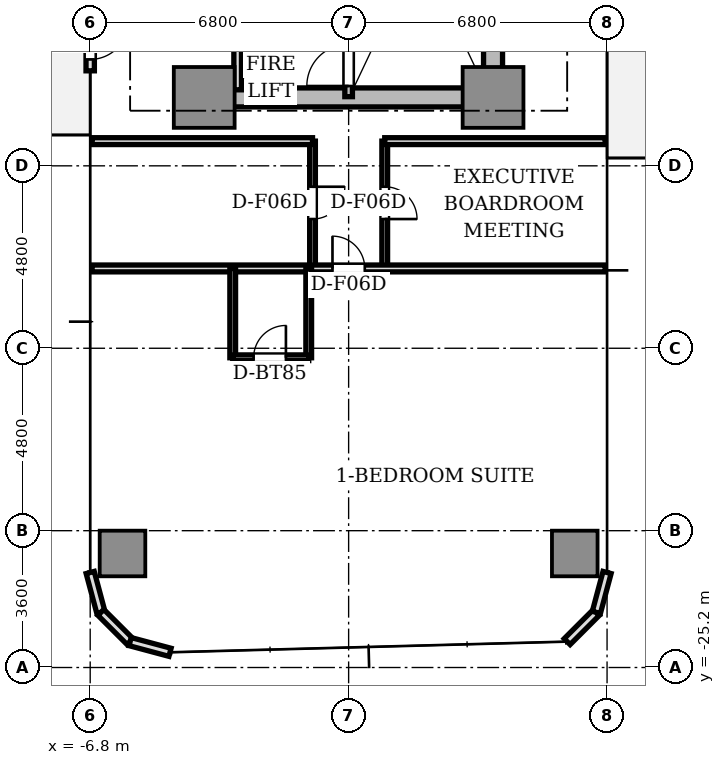
"""IFC4 building model, lengths in metres.
Left out: names, types, materials, properties, quantities, classifications, styles, units other than length and angle.
Written with IfcOpenShell. Run it as: python <this file> out.ifc"""

import sys

from ifc_helpers import new_model, si_unit, direction, frame, frame_2d, origin, origin_2d, place, context, subcontext, project, spatial, rectangle, extrude, source, transform, mapped, element, fill, save


model = new_model("IFC4")
c1 = context("Model", 3, precision=1e-05, world=origin(), true_north=direction((0.0, 1.0)))
c2 = subcontext(c1, "Body", "Model", "MODEL_VIEW")
j1 = project(units=[si_unit("LENGTHUNIT", "METRE"), si_unit("PLANEANGLEUNIT", "RADIAN")], contexts=[c1])
p1 = place(None, origin())
s1 = spatial("IfcSite", under=j1, at=p1, CompositionType="ELEMENT")
p2 = place(p1, origin())
s2 = spatial("IfcBuilding", under=s1, at=p2, CompositionType="ELEMENT")
p3 = place(p2, frame((0.0, 0.0, 51.05)))
s3 = spatial("IfcBuildingStorey", under=s2, at=p3, CompositionType="ELEMENT", Elevation=51.05)
p4 = place(p3, frame((-3.55, -10.2, 0.0), z_axis=(0.0, 0.0, 1.0), x_axis=(1.0, 0.0, 0.0)))
e1 = element("IfcWall", 1, at=p4, inside=s3, PredefinedType="SHEAR", context=c2, shape_type="SweptSolid", body=[
    extrude(rectangle(XDim=7.1, YDim=0.5, at=frame_2d((3.55, 0.0))), origin(), (0.0, 0.0, 1.0), 3.11),
])
p5 = place(p3, frame((3.8, -9.75, 0.0), z_axis=(0.0, 0.0, 1.0), x_axis=(0.0, 1.0, 0.0)))
e2 = element("IfcWall", 2, at=p5, inside=s3, PredefinedType="SHEAR", context=c2, shape_type="SweptSolid", body=[
    extrude(rectangle(XDim=6.9, YDim=0.5, at=frame_2d((3.45, 0.0))), origin(), (0.0, 0.0, 1.0), 3.11),
])
m1 = source(origin(), c2, "Body", "SweptSolid", [
    extrude(rectangle(XDim=1.6, YDim=1.6, at=origin_2d()), origin(), (0.0, 0.0, 1.0), 3.11),
])
for number, where, z_axis, x_axis in (
    (3, (-3.8, -10.2, 0.0), (0.0, 0.0, 1.0), (1.0, 0.0, 0.0)),
    (4, (3.8, -10.2, 0.0), (0.0, 0.0, 1.0), (1.0, 0.0, 0.0)),
):
    element("IfcColumn", number, at=place(p3, frame(where, z_axis=z_axis, x_axis=x_axis)), inside=s3, PredefinedType="COLUMN", context=c2, shape_type="MappedRepresentation", body=[
        mapped(m1, transform((0.0, 0.0, 0.0), scale=1.0)),
    ])
m2 = source(origin(), c2, "Body", "SweptSolid", [
    extrude(rectangle(XDim=1.2, YDim=1.2, at=origin_2d()), origin(), (0.0, 0.0, 1.0), 3.11),
])
for number, where, z_axis, x_axis in (
    (5, (-5.95, -22.2, 0.0), (0.0, 0.0, 1.0), (1.0, 0.0, 0.0)),
    (6, (5.95, -22.2, 0.0), (0.0, 0.0, 1.0), (1.0, 0.0, 0.0)),
):
    element("IfcColumn", number, at=place(p3, frame(where, z_axis=z_axis, x_axis=x_axis)), inside=s3, PredefinedType="COLUMN", context=c2, shape_type="MappedRepresentation", body=[
        mapped(m2, transform((0.0, 0.0, 0.0), scale=1.0)),
    ])
p6 = place(p3, frame((-6.8, -6.8, 0.0), z_axis=(0.0, 0.0, 1.0), x_axis=(0.0, -1.0, 0.0)))
e7 = element("IfcWall", 7, at=p6, inside=s3, PredefinedType="STANDARD", context=c2, shape_type="SweptSolid", body=[
    extrude(rectangle(XDim=2.7, YDim=0.22, at=frame_2d((1.35, 0.0))), origin(), (0.0, 0.0, 1.0), 3.11),
])
p7 = place(p6, frame((1.4, 0.0, 0.0)))
e8 = element("IfcOpeningElement", 8, at=p7, cuts=e7, PredefinedType="OPENING", context=c2, shape_type="SweptSolid", body=[
    extrude(rectangle(XDim=1.0, YDim=2.2, at=frame_2d((0.5, 1.1))), frame((0.0, 0.12, 0.0), z_axis=(0.0, -1.0, 0.0), x_axis=(1.0, 0.0, 0.0)), (0.0, 0.0, 1.0), 0.24),
])
for number, where, z_axis, x_axis in (
    (9, (-6.8, -22.7, 0.0), (0.0, 0.0, 1.0), (0.259, -0.966, 0.0)),
    (10, (-6.519, -23.75, 0.0), (0.0, 0.0, 1.0), (0.707, -0.707, 0.0)),
    (11, (-5.75, -24.519, 0.0), (0.0, 0.0, 1.0), (0.966, -0.259, 0.0)),
    (12, (5.75, -24.519, 0.0), (0.0, 0.0, 1.0), (0.707, 0.707, 0.0)),
    (13, (6.519, -23.75, 0.0), (0.0, 0.0, 1.0), (0.259, 0.966, 0.0)),
):
    element("IfcWall", number, at=place(p3, frame(where, z_axis=z_axis, x_axis=x_axis)), inside=s3, PredefinedType="STANDARD", context=c2, shape_type="SweptSolid", body=[
        extrude(rectangle(XDim=1.087, YDim=0.22, at=frame_2d((0.543, 0.0))), origin(), (0.0, 0.0, 1.0), 3.11),
    ])
p8 = place(p3, frame((0.0, -10.18, 0.0), z_axis=(0.0, 0.0, 1.0), x_axis=(0.0, 1.0, 0.0)))
e14 = element("IfcWall", 14, at=p8, inside=s3, PredefinedType="SOLIDWALL", context=c2, shape_type="SweptSolid", body=[
    extrude(rectangle(XDim=7.68, YDim=0.2, at=frame_2d((3.84, 0.0))), origin(), (0.0, 0.0, 1.0), 3.11),
])
p9 = place(p8, frame((0.28, 0.0, 0.0)))
e15 = element("IfcOpeningElement", 15, at=p9, cuts=e14, PredefinedType="OPENING", context=c2, shape_type="SweptSolid", body=[
    extrude(rectangle(XDim=1.1, YDim=2.15, at=frame_2d((0.55, 1.075))), frame((0.0, 0.11, 0.0), z_axis=(0.0, -1.0, 0.0), x_axis=(1.0, 0.0, 0.0)), (0.0, 0.0, 1.0), 0.22),
])
p10 = place(p3, frame((-2.92, -10.0, 0.0), z_axis=(0.0, 0.0, 1.0), x_axis=(0.0, 1.0, 0.0)))
e16 = element("IfcWall", 16, at=p10, inside=s3, PredefinedType="SOLIDWALL", context=c2, shape_type="SweptSolid", body=[
    extrude(rectangle(XDim=1.44, YDim=0.2, at=frame_2d((0.72, 0.0))), origin(), (0.0, 0.0, 1.0), 2.66),
])
p11 = place(p3, frame((0.95, -11.35, 0.0), z_axis=(0.0, 0.0, 1.0), x_axis=(0.0, -1.0, 0.0)))
e17 = element("IfcWall", 17, at=p11, inside=s3, PredefinedType="PARTITIONING", context=c2, shape_type="SweptSolid", body=[
    extrude(rectangle(XDim=3.35, YDim=0.15, at=frame_2d((1.675, 0.0))), origin(), (0.0, 0.0, 1.0), 2.66),
])
p12 = place(p11, frame((1.2, 0.0, 0.0)))
e18 = element("IfcOpeningElement", 18, at=p12, cuts=e17, PredefinedType="OPENING", context=c2, shape_type="SweptSolid", body=[
    extrude(rectangle(XDim=0.85, YDim=2.1, at=frame_2d((0.425, 1.05))), frame((0.0, 0.085, 0.0), z_axis=(0.0, -1.0, 0.0), x_axis=(1.0, 0.0, 0.0)), (0.0, 0.0, 1.0), 0.17),
])
p13 = place(p3, frame((-0.95, -11.35, 0.0), z_axis=(0.0, 0.0, 1.0), x_axis=(0.0, -1.0, 0.0)))
e19 = element("IfcWall", 19, at=p13, inside=s3, PredefinedType="PARTITIONING", context=c2, shape_type="SweptSolid", body=[
    extrude(rectangle(XDim=3.35, YDim=0.15, at=frame_2d((1.675, 0.0))), origin(), (0.0, 0.0, 1.0), 2.66),
])
p14 = place(p13, frame((1.2, 0.0, 0.0)))
e20 = element("IfcOpeningElement", 20, at=p14, cuts=e19, PredefinedType="OPENING", context=c2, shape_type="SweptSolid", body=[
    extrude(rectangle(XDim=0.85, YDim=2.1, at=frame_2d((0.425, 1.05))), frame((0.0, 0.085, 0.0), z_axis=(0.0, -1.0, 0.0), x_axis=(1.0, 0.0, 0.0)), (0.0, 0.0, 1.0), 0.17),
])
for number, where, z_axis, x_axis in (
    (21, (0.95, -11.35, 0.0), (0.0, 0.0, 1.0), (1.0, 0.0, 0.0)),
    (22, (-6.75, -11.35, 0.0), (0.0, 0.0, 1.0), (1.0, 0.0, 0.0)),
):
    element("IfcWall", number, at=place(p3, frame(where, z_axis=z_axis, x_axis=x_axis)), inside=s3, PredefinedType="PARTITIONING", context=c2, shape_type="SweptSolid", body=[
        extrude(rectangle(XDim=5.8, YDim=0.18, at=frame_2d((2.9, 0.0))), origin(), (0.0, 0.0, 1.0), 2.66),
    ])
p15 = place(p3, frame((-6.75, -14.7, 0.0), z_axis=(0.0, 0.0, 1.0), x_axis=(1.0, 0.0, 0.0)))
e23 = element("IfcWall", 23, at=p15, inside=s3, PredefinedType="PARTITIONING", context=c2, shape_type="SweptSolid", body=[
    extrude(rectangle(XDim=13.5, YDim=0.18, at=frame_2d((6.75, 0.0))), origin(), (0.0, 0.0, 1.0), 2.66),
])
p16 = place(p15, frame((6.325, 0.0, 0.0)))
e24 = element("IfcOpeningElement", 24, at=p16, cuts=e23, PredefinedType="OPENING", context=c2, shape_type="SweptSolid", body=[
    extrude(rectangle(XDim=0.85, YDim=2.1, at=frame_2d((0.425, 1.05))), frame((0.0, 0.1, 0.0), z_axis=(0.0, -1.0, 0.0), x_axis=(1.0, 0.0, 0.0)), (0.0, 0.0, 1.0), 0.2),
])
for number, where, z_axis, x_axis in (
    (25, (-1.05, -14.7, 0.0), (0.0, 0.0, 1.0), (0.0, -1.0, 0.0)),
    (26, (-3.05, -14.7, 0.0), (0.0, 0.0, 1.0), (0.0, -1.0, 0.0)),
):
    element("IfcWall", number, at=place(p3, frame(where, z_axis=z_axis, x_axis=x_axis)), inside=s3, PredefinedType="PARTITIONING", context=c2, shape_type="SweptSolid", body=[
        extrude(rectangle(XDim=2.35, YDim=0.15, at=frame_2d((1.175, 0.0))), origin(), (0.0, 0.0, 1.0), 2.66),
    ])
p17 = place(p3, frame((-3.05, -17.05, 0.0), z_axis=(0.0, 0.0, 1.0), x_axis=(1.0, 0.0, 0.0)))
e27 = element("IfcWall", 27, at=p17, inside=s3, PredefinedType="PARTITIONING", context=c2, shape_type="SweptSolid", body=[
    extrude(rectangle(XDim=2.0, YDim=0.15, at=frame_2d((1.0, 0.0))), origin(), (0.0, 0.0, 1.0), 2.66),
])
p18 = place(p17, frame((0.55, 0.0, 0.0)))
e28 = element("IfcOpeningElement", 28, at=p18, cuts=e27, PredefinedType="OPENING", context=c2, shape_type="SweptSolid", body=[
    extrude(rectangle(XDim=0.85, YDim=2.1, at=frame_2d((0.425, 1.05))), frame((0.0, 0.085, 0.0), z_axis=(0.0, -1.0, 0.0), x_axis=(1.0, 0.0, 0.0)), (0.0, 0.0, 1.0), 0.17),
])
m3 = source(origin(), c2, "Body", "SweptSolid", [
    extrude(rectangle(XDim=1.0, YDim=0.05, at=origin_2d()), origin(), (0.0, 0.0, 1.0), 2.2),
])
p19 = place(p7, frame((0.5, 0.0, 0.0)))
e29 = element("IfcDoor", 29, at=p19, inside=s3, OperationType="SINGLE_SWING_LEFT", PredefinedType="DOOR", context=c2, shape_type="MappedRepresentation", body=[
    mapped(m3, transform((0.0, 0.0, 0.0), scale=1.0)),
])
fill(e8, e29)
m4 = source(origin(), c2, "Body", "SweptSolid", [
    extrude(rectangle(XDim=1.1, YDim=0.05, at=origin_2d()), origin(), (0.0, 0.0, 1.0), 2.15),
])
p20 = place(p9, frame((0.55, 0.0, 0.0)))
e30 = element("IfcDoor", 30, at=p20, inside=s3, OperationType="SINGLE_SWING_LEFT", PredefinedType="DOOR", context=c2, shape_type="MappedRepresentation", body=[
    mapped(m4, transform((0.0, 0.0, 0.0), scale=1.0)),
])
fill(e15, e30)
m5 = source(origin(), c2, "Body", "SweptSolid", [
    extrude(rectangle(XDim=0.85, YDim=0.05, at=origin_2d()), origin(), (0.0, 0.0, 1.0), 2.1),
])
p21 = place(p12, frame((0.425, 0.0, 0.0)))
e31 = element("IfcDoor", 31, at=p21, inside=s3, OperationType="SINGLE_SWING_RIGHT", PredefinedType="DOOR", context=c2, shape_type="MappedRepresentation", body=[
    mapped(m5, transform((0.0, 0.0, 0.0), scale=1.0)),
])
fill(e18, e31)
p22 = place(p14, frame((0.425, 0.0, 0.0)))
e32 = element("IfcDoor", 32, at=p22, inside=s3, OperationType="SINGLE_SWING_LEFT", PredefinedType="DOOR", context=c2, shape_type="MappedRepresentation", body=[
    mapped(m5, transform((0.0, 0.0, 0.0), scale=1.0)),
])
fill(e20, e32)
p23 = place(p18, frame((0.425, 0.0, 0.0)))
e33 = element("IfcDoor", 33, at=p23, inside=s3, OperationType="SINGLE_SWING_RIGHT", PredefinedType="DOOR", context=c2, shape_type="MappedRepresentation", body=[
    mapped(m5, transform((0.0, 0.0, 0.0), scale=1.0)),
])
fill(e28, e33)
p24 = place(p16, frame((0.425, 0.0, 0.0)))
e34 = element("IfcDoor", 34, at=p24, inside=s3, OperationType="SINGLE_SWING_LEFT", PredefinedType="DOOR", context=c2, shape_type="MappedRepresentation", body=[
    mapped(m5, transform((0.0, 0.0, 0.0), scale=1.0)),
])
fill(e24, e34)
save(model, sys.argv[1])
